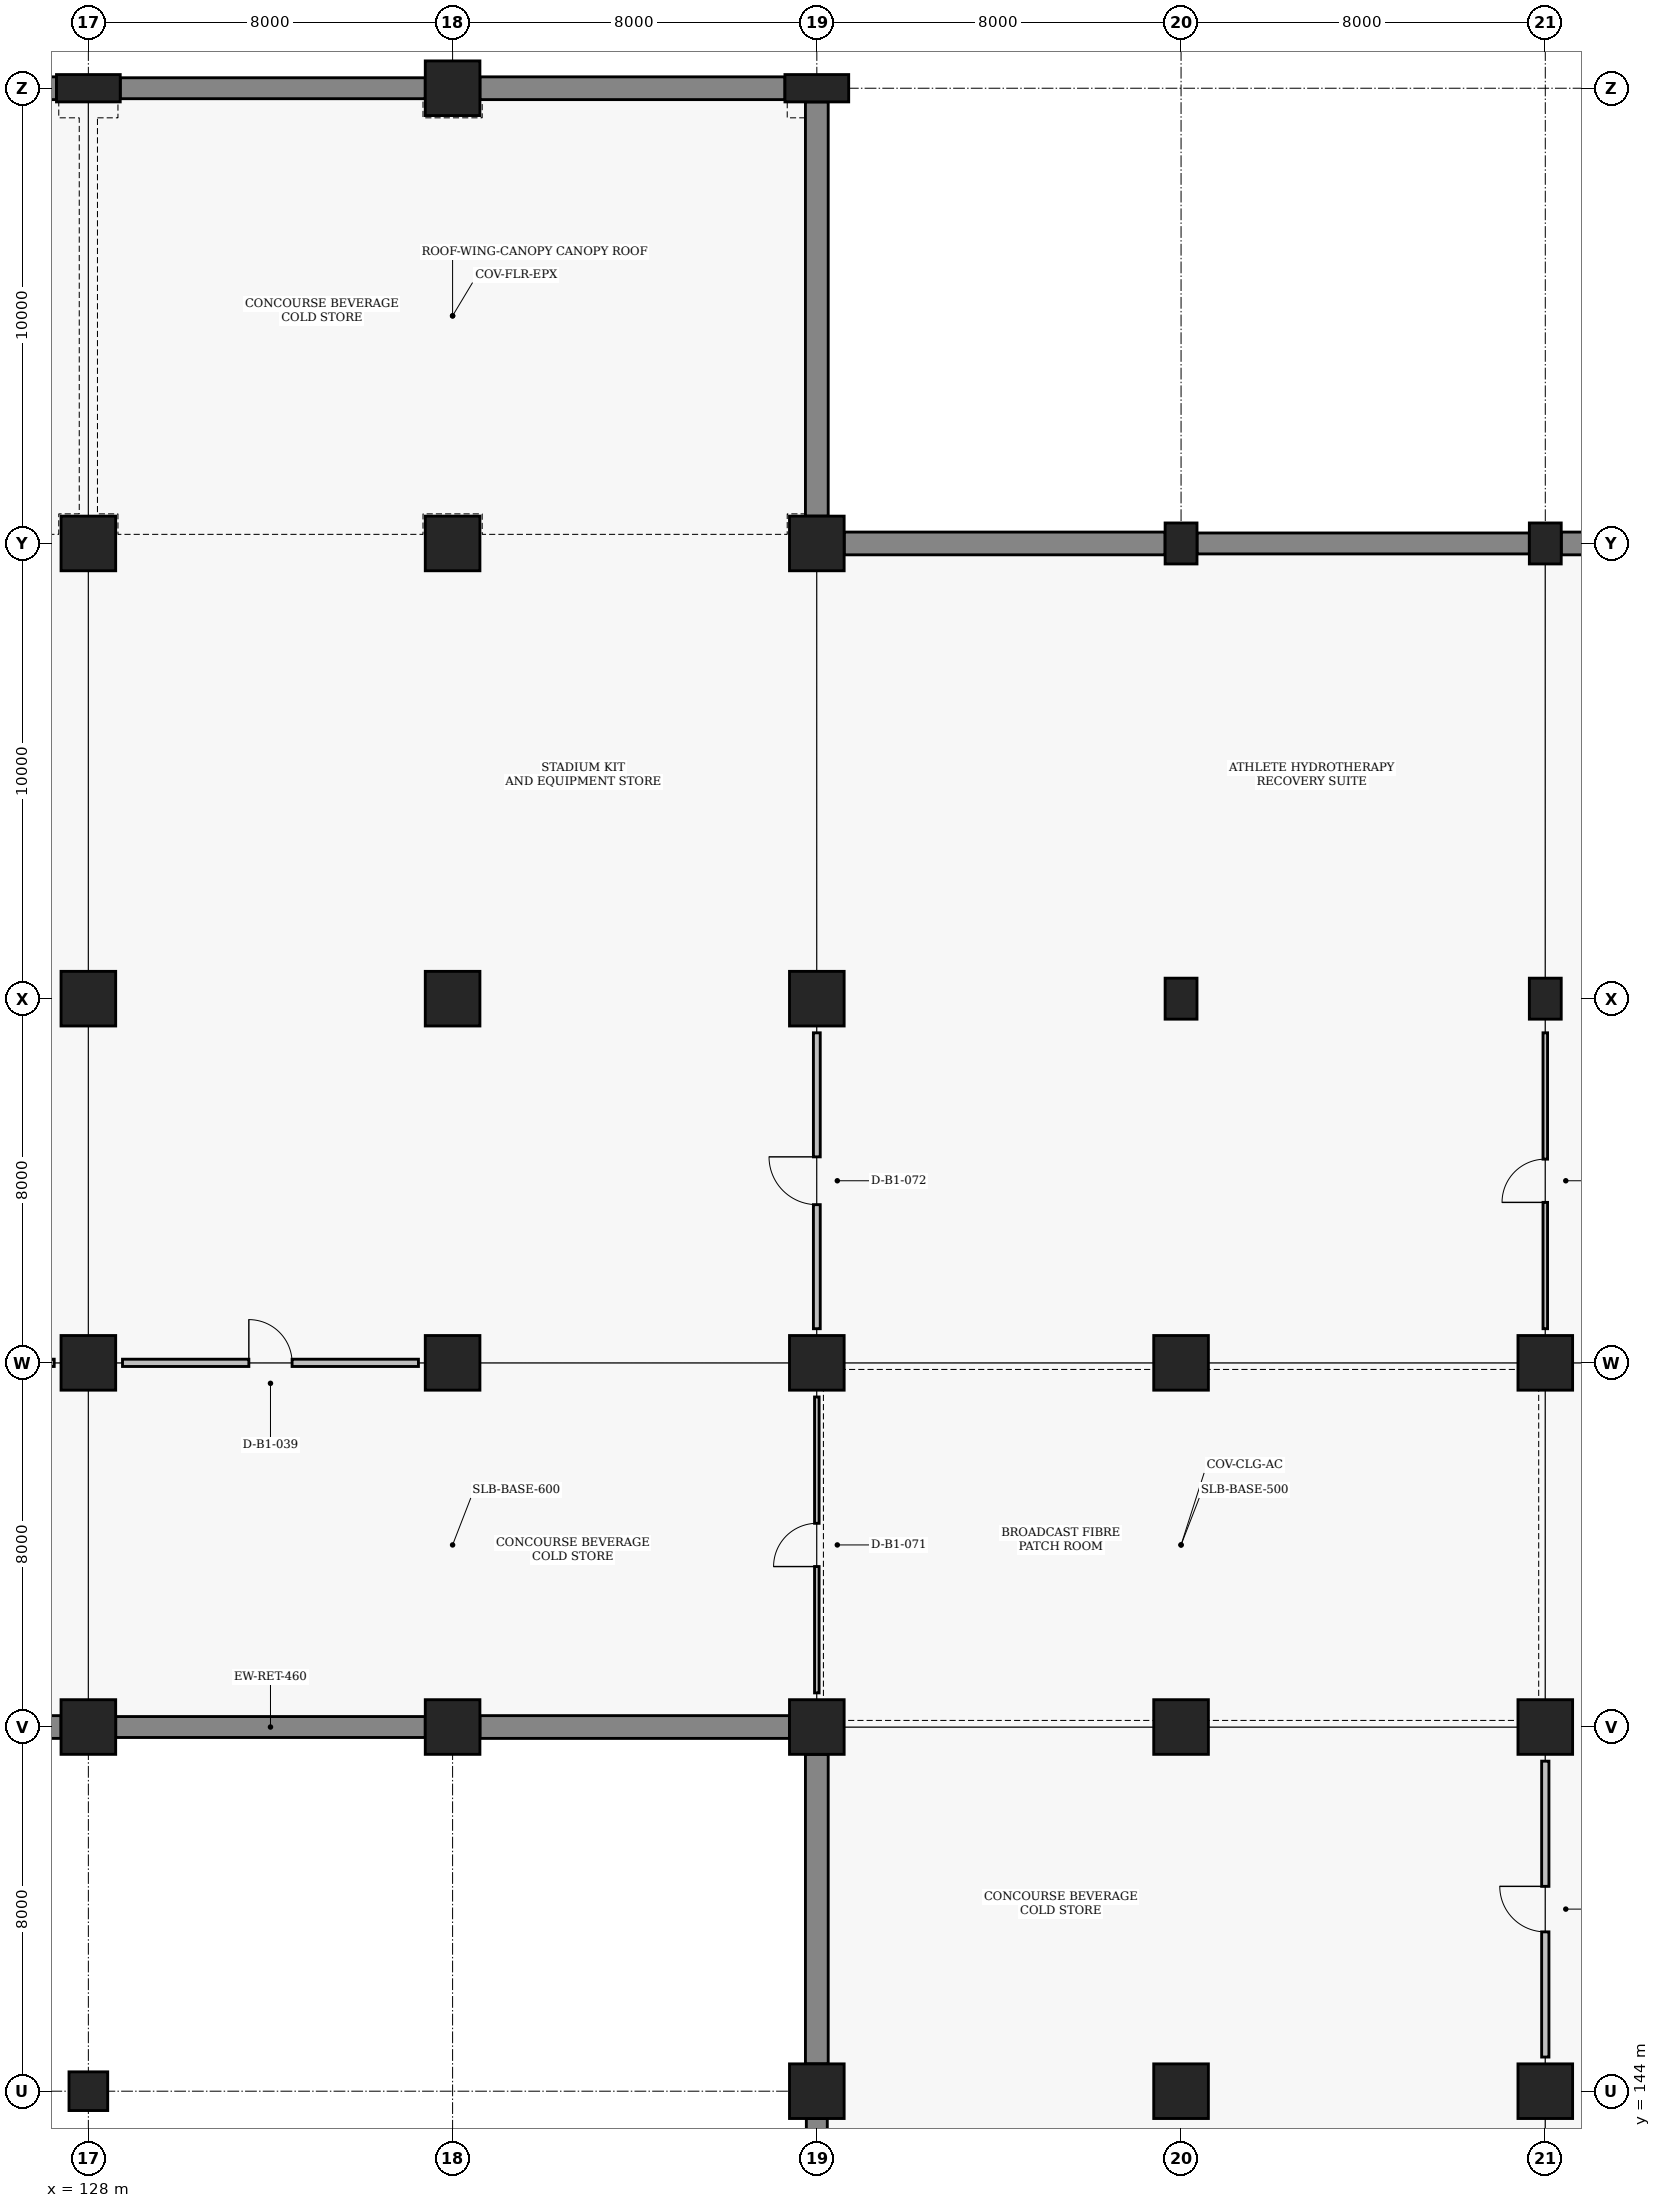
"""IFC4 building model, lengths in metres.
Left out: names, types, materials, properties, quantities, classifications, styles, units other than length and angle.
Written with IfcOpenShell. Run it as: python <this file> out.ifc"""

import sys

from ifc_helpers import new_model, si_unit, direction, frame, frame_2d, origin, origin_2d, place, context, subcontext, project, spatial, rectangle, circle, extrude, element, fill, save


model = new_model("IFC4")
c1 = context("Model", 3, precision=1e-05, world=origin(), true_north=direction((0.0, 1.0)))
c2 = subcontext(c1, "Body", "Model", "MODEL_VIEW")
j1 = project(units=[si_unit("LENGTHUNIT", "METRE"), si_unit("PLANEANGLEUNIT", "RADIAN")], contexts=[c1])
p1 = place(None, origin())
s1 = spatial("IfcSite", under=j1, at=p1, CompositionType="ELEMENT")
p2 = place(p1, origin())
s2 = spatial("IfcBuilding", under=s1, at=p2, CompositionType="ELEMENT")
p3 = place(p2, frame((0.0, 0.0, -5.4)))
s3 = spatial("IfcBuildingStorey", under=s2, at=p3, CompositionType="ELEMENT", Elevation=-5.4)
for number, where, z_axis, x_axis in (
    (1, (128.0, 152.0, 0.0), (0.0, 0.0, 1.0), (1.0, 0.0, 0.0)),
    (2, (128.0, 160.0, 0.0), (0.0, 0.0, 1.0), (1.0, 0.0, 0.0)),
    (3, (128.0, 168.0, 0.0), (0.0, 0.0, 1.0), (1.0, 0.0, 0.0)),
    (4, (128.0, 178.0, 0.0), (0.0, 0.0, 1.0), (1.0, 0.0, 0.0)),
):
    element("IfcColumn", number, at=place(p3, frame(where, z_axis=z_axis, x_axis=x_axis)), inside=s3, PredefinedType="COLUMN", context=c2, shape_type="SweptSolid", body=[
        extrude(rectangle(XDim=1.2, YDim=1.2, at=origin_2d()), origin(), (0.0, 0.0, 1.0), 5.4),
    ])
p4 = place(p3, frame((128.0, 188.0, 0.0), z_axis=(0.0, 0.0, 1.0), x_axis=(0.0, 1.0, 0.0)))
e5 = element("IfcColumn", 5, at=p4, inside=s3, PredefinedType="PILASTER", context=c2, shape_type="SweptSolid", body=[
    extrude(rectangle(XDim=0.6, YDim=1.4, at=origin_2d()), origin(), (0.0, 0.0, 1.0), 5.4),
])
for number, where, z_axis, x_axis in (
    (6, (136.0, 152.0, 0.0), (0.0, 0.0, 1.0), (1.0, 0.0, 0.0)),
    (7, (136.0, 160.0, 0.0), (0.0, 0.0, 1.0), (1.0, 0.0, 0.0)),
    (8, (136.0, 168.0, 0.0), (0.0, 0.0, 1.0), (1.0, 0.0, 0.0)),
    (9, (136.0, 178.0, 0.0), (0.0, 0.0, 1.0), (1.0, 0.0, 0.0)),
    (10, (136.0, 188.0, 0.0), (0.0, 0.0, 1.0), (1.0, 0.0, 0.0)),
    (11, (144.0, 144.0, 0.0), (0.0, 0.0, 1.0), (1.0, 0.0, 0.0)),
    (12, (144.0, 152.0, 0.0), (0.0, 0.0, 1.0), (1.0, 0.0, 0.0)),
    (13, (144.0, 160.0, 0.0), (0.0, 0.0, 1.0), (1.0, 0.0, 0.0)),
    (14, (144.0, 168.0, 0.0), (0.0, 0.0, 1.0), (1.0, 0.0, 0.0)),
    (15, (144.0, 178.0, 0.0), (0.0, 0.0, 1.0), (1.0, 0.0, 0.0)),
):
    element("IfcColumn", number, at=place(p3, frame(where, z_axis=z_axis, x_axis=x_axis)), inside=s3, PredefinedType="COLUMN", context=c2, shape_type="SweptSolid", body=[
        extrude(rectangle(XDim=1.2, YDim=1.2, at=origin_2d()), origin(), (0.0, 0.0, 1.0), 5.4),
    ])
p5 = place(p3, frame((144.0, 188.0, 0.0), z_axis=(0.0, 0.0, 1.0), x_axis=(0.0, 1.0, 0.0)))
e16 = element("IfcColumn", 16, at=p5, inside=s3, PredefinedType="PILASTER", context=c2, shape_type="SweptSolid", body=[
    extrude(rectangle(XDim=0.6, YDim=1.4, at=origin_2d()), origin(), (0.0, 0.0, 1.0), 5.4),
])
for number, where, z_axis, x_axis in (
    (17, (152.0, 144.0, 0.0), (0.0, 0.0, 1.0), (1.0, 0.0, 0.0)),
    (18, (152.0, 152.0, 0.0), (0.0, 0.0, 1.0), (1.0, 0.0, 0.0)),
    (19, (152.0, 160.0, 0.0), (0.0, 0.0, 1.0), (1.0, 0.0, 0.0)),
):
    element("IfcColumn", number, at=place(p3, frame(where, z_axis=z_axis, x_axis=x_axis)), inside=s3, PredefinedType="COLUMN", context=c2, shape_type="SweptSolid", body=[
        extrude(rectangle(XDim=1.2, YDim=1.2, at=origin_2d()), origin(), (0.0, 0.0, 1.0), 5.4),
    ])
for number, where, z_axis, x_axis in (
    (20, (152.0, 168.0, 0.0), (0.0, 0.0, 1.0), (1.0, 0.0, 0.0)),
    (21, (152.0, 178.0, 0.0), (0.0, 0.0, 1.0), (1.0, 0.0, 0.0)),
):
    element("IfcColumn", number, at=place(p3, frame(where, z_axis=z_axis, x_axis=x_axis)), inside=s3, PredefinedType="COLUMN", context=c2, shape_type="SweptSolid", body=[
        extrude(rectangle(XDim=0.7, YDim=0.9, at=origin_2d()), origin(), (0.0, 0.0, 1.0), 5.4),
    ])
for number, where, z_axis, x_axis in (
    (22, (160.0, 144.0, 0.0), (0.0, 0.0, 1.0), (1.0, 0.0, 0.0)),
    (23, (160.0, 152.0, 0.0), (0.0, 0.0, 1.0), (1.0, 0.0, 0.0)),
    (24, (160.0, 160.0, 0.0), (0.0, 0.0, 1.0), (1.0, 0.0, 0.0)),
):
    element("IfcColumn", number, at=place(p3, frame(where, z_axis=z_axis, x_axis=x_axis)), inside=s3, PredefinedType="COLUMN", context=c2, shape_type="SweptSolid", body=[
        extrude(rectangle(XDim=1.2, YDim=1.2, at=origin_2d()), origin(), (0.0, 0.0, 1.0), 5.4),
    ])
for number, where, z_axis, x_axis in (
    (25, (160.0, 168.0, 0.0), (0.0, 0.0, 1.0), (1.0, 0.0, 0.0)),
    (26, (160.0, 178.0, 0.0), (0.0, 0.0, 1.0), (1.0, 0.0, 0.0)),
):
    element("IfcColumn", number, at=place(p3, frame(where, z_axis=z_axis, x_axis=x_axis)), inside=s3, PredefinedType="COLUMN", context=c2, shape_type="SweptSolid", body=[
        extrude(rectangle(XDim=0.7, YDim=0.9, at=origin_2d()), origin(), (0.0, 0.0, 1.0), 5.4),
    ])
p6 = place(p3, frame((128.0, 144.0, 0.0), z_axis=(0.0, 0.0, 1.0), x_axis=(1.0, 0.0, 0.0)))
e27 = element("IfcColumn", 27, at=p6, inside=s3, PredefinedType="COLUMN", context=c2, shape_type="SweptSolid", body=[
    extrude(circle(Radius=0.425, at=origin_2d()), origin(), (0.0, 0.0, 1.0), 5.4),
])
p7 = place(p3, frame((120.6, 152.0, 0.0), z_axis=(0.0, 0.0, 1.0), x_axis=(1.0, 0.0, 0.0)))
e28 = element("IfcWall", 28, at=p7, inside=s3, PredefinedType="STANDARD", context=c2, shape_type="SweptSolid", body=[
    extrude(rectangle(XDim=6.8, YDim=0.5, at=frame_2d((3.4, 0.0))), origin(), (0.0, 0.0, 1.0), 4.34),
])
p8 = place(p3, frame((120.6, 188.0, 0.0), z_axis=(0.0, 0.0, 1.0), x_axis=(1.0, 0.0, 0.0)))
e29 = element("IfcWall", 29, at=p8, inside=s3, PredefinedType="STANDARD", context=c2, shape_type="SweptSolid", body=[
    extrude(rectangle(XDim=6.7, YDim=0.5, at=frame_2d((3.35, 0.0))), origin(), (0.0, 0.0, 1.0), 4.34),
])
p9 = place(p3, frame((128.6, 152.0, 0.0), z_axis=(0.0, 0.0, 1.0), x_axis=(1.0, 0.0, 0.0)))
e30 = element("IfcWall", 30, at=p9, inside=s3, PredefinedType="STANDARD", context=c2, shape_type="SweptSolid", body=[
    extrude(rectangle(XDim=6.8, YDim=0.46, at=frame_2d((3.4, 0.0))), origin(), (0.0, 0.0, 1.0), 4.34),
])
p10 = place(p3, frame((128.7, 188.0, 0.0), z_axis=(0.0, 0.0, 1.0), x_axis=(1.0, 0.0, 0.0)))
e31 = element("IfcWall", 31, at=p10, inside=s3, PredefinedType="STANDARD", context=c2, shape_type="SweptSolid", body=[
    extrude(rectangle(XDim=6.7, YDim=0.46, at=frame_2d((3.35, 0.0))), origin(), (0.0, 0.0, 1.0), 4.34),
])
p11 = place(p3, frame((136.6, 152.0, 0.0), z_axis=(0.0, 0.0, 1.0), x_axis=(1.0, 0.0, 0.0)))
e32 = element("IfcWall", 32, at=p11, inside=s3, PredefinedType="STANDARD", context=c2, shape_type="SweptSolid", body=[
    extrude(rectangle(XDim=6.8, YDim=0.5, at=frame_2d((3.4, 0.0))), origin(), (0.0, 0.0, 1.0), 4.24),
])
p12 = place(p3, frame((136.6, 188.0, 0.0), z_axis=(0.0, 0.0, 1.0), x_axis=(1.0, 0.0, 0.0)))
e33 = element("IfcWall", 33, at=p12, inside=s3, PredefinedType="STANDARD", context=c2, shape_type="SweptSolid", body=[
    extrude(rectangle(XDim=6.7, YDim=0.5, at=frame_2d((3.35, 0.0))), origin(), (0.0, 0.0, 1.0), 4.34),
])
p13 = place(p3, frame((144.0, 178.6, 0.0), z_axis=(0.0, 0.0, 1.0), x_axis=(0.0, 1.0, 0.0)))
e34 = element("IfcWall", 34, at=p13, inside=s3, PredefinedType="STANDARD", context=c2, shape_type="SweptSolid", body=[
    extrude(rectangle(XDim=9.1, YDim=0.5, at=frame_2d((4.55, 0.0))), origin(), (0.0, 0.0, 1.0), 4.24),
])
p14 = place(p3, frame((144.0, 136.6, 0.0), z_axis=(0.0, 0.0, 1.0), x_axis=(0.0, 1.0, 0.0)))
e35 = element("IfcWall", 35, at=p14, inside=s3, PredefinedType="STANDARD", context=c2, shape_type="SweptSolid", body=[
    extrude(rectangle(XDim=6.8, YDim=0.46, at=frame_2d((3.4, 0.0))), origin(), (0.0, 0.0, 1.0), 3.69),
])
p15 = place(p3, frame((144.0, 144.6, 0.0), z_axis=(0.0, 0.0, 1.0), x_axis=(0.0, 1.0, 0.0)))
e36 = element("IfcWall", 36, at=p15, inside=s3, PredefinedType="STANDARD", context=c2, shape_type="SweptSolid", body=[
    extrude(rectangle(XDim=6.8, YDim=0.5, at=frame_2d((3.4, 0.0))), origin(), (0.0, 0.0, 1.0), 4.24),
])
p16 = place(p3, frame((144.6, 178.0, 0.0), z_axis=(0.0, 0.0, 1.0), x_axis=(1.0, 0.0, 0.0)))
e37 = element("IfcWall", 37, at=p16, inside=s3, PredefinedType="STANDARD", context=c2, shape_type="SweptSolid", body=[
    extrude(rectangle(XDim=7.05, YDim=0.5, at=frame_2d((3.525, 0.0))), origin(), (0.0, 0.0, 1.0), 4.24),
])
p17 = place(p3, frame((152.35, 178.0, 0.0), z_axis=(0.0, 0.0, 1.0), x_axis=(1.0, 0.0, 0.0)))
e38 = element("IfcWall", 38, at=p17, inside=s3, PredefinedType="STANDARD", context=c2, shape_type="SweptSolid", body=[
    extrude(rectangle(XDim=7.3, YDim=0.46, at=frame_2d((3.65, 0.0))), origin(), (0.0, 0.0, 1.0), 4.29),
])
p18 = place(p3, frame((160.35, 178.0, 0.0), z_axis=(0.0, 0.0, 1.0), x_axis=(1.0, 0.0, 0.0)))
e39 = element("IfcWall", 39, at=p18, inside=s3, PredefinedType="STANDARD", context=c2, shape_type="SweptSolid", body=[
    extrude(rectangle(XDim=7.3, YDim=0.5, at=frame_2d((3.65, 0.0))), origin(), (0.0, 0.0, 1.0), 4.29),
])
p19 = place(p3, frame((120.75, 160.0, 0.0), z_axis=(0.0, 0.0, 1.0), x_axis=(1.0, 0.0, 0.0)))
e40 = element("IfcWall", 40, at=p19, inside=s3, PredefinedType="PARTITIONING", context=c2, shape_type="SweptSolid", body=[
    extrude(rectangle(XDim=6.5, YDim=0.16, at=frame_2d((3.25, 0.0))), origin(), (0.0, 0.0, 1.0), 3.69),
])
p20 = place(p19, frame((2.775, 0.0, 0.0)))
e41 = element("IfcOpeningElement", 41, at=p20, cuts=e40, PredefinedType="OPENING", context=c2, shape_type="SweptSolid", body=[
    extrude(rectangle(XDim=0.95, YDim=2.1, at=frame_2d((0.475, 1.05))), frame((0.0, 0.09, 0.0), z_axis=(0.0, -1.0, 0.0), x_axis=(1.0, 0.0, 0.0)), (0.0, 0.0, 1.0), 0.18),
])
p21 = place(p3, frame((128.75, 160.0, 0.0), z_axis=(0.0, 0.0, 1.0), x_axis=(1.0, 0.0, 0.0)))
e42 = element("IfcWall", 42, at=p21, inside=s3, PredefinedType="PARTITIONING", context=c2, shape_type="SweptSolid", body=[
    extrude(rectangle(XDim=6.5, YDim=0.16, at=frame_2d((3.25, 0.0))), origin(), (0.0, 0.0, 1.0), 3.69),
])
p22 = place(p21, frame((2.775, 0.0, 0.0)))
e43 = element("IfcOpeningElement", 43, at=p22, cuts=e42, PredefinedType="OPENING", context=c2, shape_type="SweptSolid", body=[
    extrude(rectangle(XDim=0.95, YDim=2.1, at=frame_2d((0.475, 1.05))), frame((0.0, 0.09, 0.0), z_axis=(0.0, -1.0, 0.0), x_axis=(1.0, 0.0, 0.0)), (0.0, 0.0, 1.0), 0.18),
])
p23 = place(p3, frame((144.0, 152.75, 0.0), z_axis=(0.0, 0.0, 1.0), x_axis=(0.0, 1.0, 0.0)))
e44 = element("IfcWall", 44, at=p23, inside=s3, PredefinedType="PARTITIONING", context=c2, shape_type="SweptSolid", body=[
    extrude(rectangle(XDim=6.5, YDim=0.1, at=frame_2d((3.25, 0.0))), origin(), (0.0, 0.0, 1.0), 4.39),
])
p24 = place(p23, frame((2.775, 0.0, 0.0)))
e45 = element("IfcOpeningElement", 45, at=p24, cuts=e44, PredefinedType="OPENING", context=c2, shape_type="SweptSolid", body=[
    extrude(rectangle(XDim=0.95, YDim=2.1, at=frame_2d((0.475, 1.05))), frame((0.0, 0.06, 0.0), z_axis=(0.0, -1.0, 0.0), x_axis=(1.0, 0.0, 0.0)), (0.0, 0.0, 1.0), 0.12),
])
p25 = place(p3, frame((144.0, 160.75, 0.0), z_axis=(0.0, 0.0, 1.0), x_axis=(0.0, 1.0, 0.0)))
e46 = element("IfcWall", 46, at=p25, inside=s3, PredefinedType="PARTITIONING", context=c2, shape_type="SweptSolid", body=[
    extrude(rectangle(XDim=6.5, YDim=0.15, at=frame_2d((3.25, 0.0))), origin(), (0.0, 0.0, 1.0), 4.39),
])
p26 = place(p25, frame((2.725, 0.0, 0.0)))
e47 = element("IfcOpeningElement", 47, at=p26, cuts=e46, PredefinedType="OPENING", context=c2, shape_type="SweptSolid", body=[
    extrude(rectangle(XDim=1.05, YDim=2.15, at=frame_2d((0.525, 1.075))), frame((0.0, 0.085, 0.0), z_axis=(0.0, -1.0, 0.0), x_axis=(1.0, 0.0, 0.0)), (0.0, 0.0, 1.0), 0.17),
])
p27 = place(p3, frame((160.0, 144.75, 0.0), z_axis=(0.0, 0.0, 1.0), x_axis=(0.0, 1.0, 0.0)))
e48 = element("IfcWall", 48, at=p27, inside=s3, PredefinedType="PARTITIONING", context=c2, shape_type="SweptSolid", body=[
    extrude(rectangle(XDim=6.5, YDim=0.16, at=frame_2d((3.25, 0.0))), origin(), (0.0, 0.0, 1.0), 4.39),
])
p28 = place(p27, frame((2.75, 0.0, 0.0)))
e49 = element("IfcOpeningElement", 49, at=p28, cuts=e48, PredefinedType="OPENING", context=c2, shape_type="SweptSolid", body=[
    extrude(rectangle(XDim=1.0, YDim=2.1, at=frame_2d((0.5, 1.05))), frame((0.0, 0.09, 0.0), z_axis=(0.0, -1.0, 0.0), x_axis=(1.0, 0.0, 0.0)), (0.0, 0.0, 1.0), 0.18),
])
p29 = place(p3, frame((160.0, 160.75, 0.0), z_axis=(0.0, 0.0, 1.0), x_axis=(0.0, 1.0, 0.0)))
e50 = element("IfcWall", 50, at=p29, inside=s3, PredefinedType="PARTITIONING", context=c2, shape_type="SweptSolid", body=[
    extrude(rectangle(XDim=6.5, YDim=0.1, at=frame_2d((3.25, 0.0))), origin(), (0.0, 0.0, 1.0), 4.39),
])
p30 = place(p29, frame((2.775, 0.0, 0.0)))
e51 = element("IfcOpeningElement", 51, at=p30, cuts=e50, PredefinedType="OPENING", context=c2, shape_type="SweptSolid", body=[
    extrude(rectangle(XDim=0.95, YDim=2.1, at=frame_2d((0.475, 1.05))), frame((0.0, 0.06, 0.0), z_axis=(0.0, -1.0, 0.0), x_axis=(1.0, 0.0, 0.0)), (0.0, 0.0, 1.0), 0.12),
])
p31 = place(p22, origin())
e52 = element("IfcDoor", 52, at=p31, inside=s3, OperationType="SINGLE_SWING_LEFT", PredefinedType="DOOR", context=c2, shape_type="SweptSolid", body=[
    extrude(rectangle(XDim=0.95, YDim=2.1, at=frame_2d((0.475, 1.05))), frame((0.0, 0.025, 0.0), z_axis=(0.0, -1.0, 0.0), x_axis=(1.0, 0.0, 0.0)), (0.0, 0.0, 1.0), 0.05),
])
fill(e43, e52)
p32 = place(p24, origin())
e53 = element("IfcDoor", 53, at=p32, inside=s3, OperationType="SINGLE_SWING_LEFT", PredefinedType="DOOR", context=c2, shape_type="SweptSolid", body=[
    extrude(rectangle(XDim=0.95, YDim=2.1, at=frame_2d((0.475, 1.05))), frame((0.0, 0.025, 0.0), z_axis=(0.0, -1.0, 0.0), x_axis=(1.0, 0.0, 0.0)), (0.0, 0.0, 1.0), 0.05),
])
fill(e45, e53)
p33 = place(p26, origin())
e54 = element("IfcDoor", 54, at=p33, inside=s3, OperationType="SINGLE_SWING_RIGHT", PredefinedType="DOOR", context=c2, shape_type="SweptSolid", body=[
    extrude(rectangle(XDim=1.05, YDim=2.15, at=frame_2d((0.525, 1.075))), frame((0.0, 0.025, 0.0), z_axis=(0.0, -1.0, 0.0), x_axis=(1.0, 0.0, 0.0)), (0.0, 0.0, 1.0), 0.05),
])
fill(e47, e54)
p34 = place(p28, origin())
e55 = element("IfcDoor", 55, at=p34, inside=s3, OperationType="SINGLE_SWING_RIGHT", PredefinedType="DOOR", context=c2, shape_type="SweptSolid", body=[
    extrude(rectangle(XDim=1.0, YDim=2.1, at=frame_2d((0.5, 1.05))), frame((0.0, 0.025, 0.0), z_axis=(0.0, -1.0, 0.0), x_axis=(1.0, 0.0, 0.0)), (0.0, 0.0, 1.0), 0.05),
])
fill(e49, e55)
p35 = place(p30, origin())
e56 = element("IfcDoor", 56, at=p35, inside=s3, OperationType="SINGLE_SWING_LEFT", PredefinedType="DOOR", context=c2, shape_type="SweptSolid", body=[
    extrude(rectangle(XDim=0.95, YDim=2.1, at=frame_2d((0.475, 1.05))), frame((0.0, 0.025, 0.0), z_axis=(0.0, -1.0, 0.0), x_axis=(1.0, 0.0, 0.0)), (0.0, 0.0, 1.0), 0.05),
])
fill(e51, e56)
save(model, sys.argv[1])
